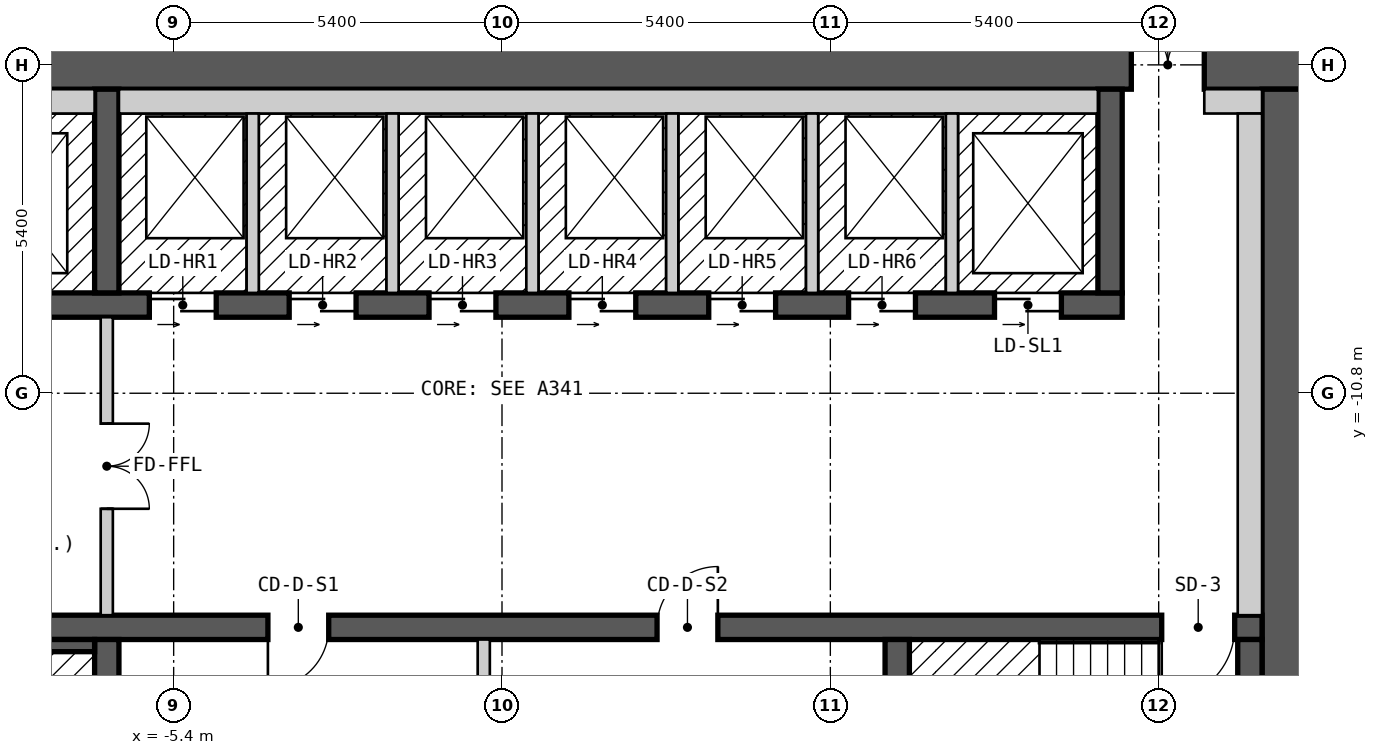
"""IFC4 building model, lengths in metres.
Left out: names, types, materials, properties, quantities, classifications, styles, units other than length and angle.
Written with IfcOpenShell. Run it as: python <this file> out.ifc"""

import sys

from ifc_helpers import new_model, si_unit, direction, frame, frame_2d, origin, place, context, subcontext, project, spatial, rectangle, extrude, element, fill, save


model = new_model("IFC4")
c1 = context("Model", 3, precision=1e-05, world=origin(), true_north=direction((0.0, 1.0)))
c2 = subcontext(c1, "Body", "Model", "MODEL_VIEW")
j1 = project(units=[si_unit("LENGTHUNIT", "METRE"), si_unit("PLANEANGLEUNIT", "RADIAN")], contexts=[c1])
p1 = place(None, origin())
s1 = spatial("IfcSite", under=j1, at=p1, CompositionType="ELEMENT")
p2 = place(p1, origin())
s2 = spatial("IfcBuilding", under=s1, at=p2, CompositionType="ELEMENT")
p3 = place(p2, frame((0.0, 0.0, 150.6)))
s3 = spatial("IfcBuildingStorey", under=s2, at=p3, CompositionType="ELEMENT", Elevation=150.6)
p4 = place(p3, frame((-13.3, -5.4, 0.0), z_axis=(0.0, 0.0, 1.0), x_axis=(1.0, 0.0, 0.0)))
e1 = element("IfcWall", 1, at=p4, inside=s3, PredefinedType="SHEAR", context=c2, shape_type="SweptSolid", body=[
    extrude(rectangle(XDim=26.6, YDim=0.8, at=frame_2d((13.3, 0.0))), origin(), (0.0, 0.0, 1.0), 2.6),
])
p5 = place(p4, frame((23.65, 0.0, 0.0)))
e2 = element("IfcOpeningElement", 2, at=p5, cuts=e1, PredefinedType="OPENING", context=c2, shape_type="SweptSolid", body=[
    extrude(rectangle(XDim=1.2, YDim=2.1, at=frame_2d((0.6, 1.05))), frame((0.0, 0.41, 0.0), z_axis=(0.0, -1.0, 0.0), x_axis=(1.0, 0.0, 0.0)), (0.0, 0.0, 1.0), 0.82),
])
p6 = place(p3, frame((12.9, -18.2, 0.0), z_axis=(0.0, 0.0, 1.0), x_axis=(0.0, 1.0, 0.0)))
e3 = element("IfcWall", 3, at=p6, inside=s3, PredefinedType="SHEAR", context=c2, shape_type="SweptSolid", body=[
    extrude(rectangle(XDim=12.4, YDim=0.8, at=frame_2d((6.2, 0.0))), origin(), (0.0, 0.0, 1.0), 2.6),
])
p7 = place(p3, frame((-12.5, -14.65, 0.0), z_axis=(0.0, 0.0, 1.0), x_axis=(1.0, 0.0, 0.0)))
e4 = element("IfcWall", 4, at=p7, inside=s3, PredefinedType="SHEAR", context=c2, shape_type="SweptSolid", body=[
    extrude(rectangle(XDim=25.0, YDim=0.4, at=frame_2d((12.5, 0.0))), origin(), (0.0, 0.0, 1.0), 2.6),
])
p8 = place(p7, frame((1.7, 0.0, 0.0), z_axis=(0.0, 0.0, 1.0), x_axis=(-1.0, 0.0, 0.0)))
e5 = element("IfcOpeningElement", 5, at=p8, cuts=e4, PredefinedType="OPENING", context=c2, shape_type="SweptSolid", body=[
    extrude(rectangle(XDim=1.2, YDim=2.1, at=frame_2d((0.6, 1.05))), frame((0.0, 0.21, 0.0), z_axis=(0.0, -1.0, 0.0), x_axis=(1.0, 0.0, 0.0)), (0.0, 0.0, 1.0), 0.42),
])
p9 = place(p7, frame((24.55, 0.0, 0.0), z_axis=(0.0, 0.0, 1.0), x_axis=(-1.0, 0.0, 0.0)))
e6 = element("IfcOpeningElement", 6, at=p9, cuts=e4, PredefinedType="OPENING", context=c2, shape_type="SweptSolid", body=[
    extrude(rectangle(XDim=1.2, YDim=2.1, at=frame_2d((0.6, 1.05))), frame((0.0, 0.21, 0.0), z_axis=(0.0, -1.0, 0.0), x_axis=(1.0, 0.0, 0.0)), (0.0, 0.0, 1.0), 0.42),
])
p10 = place(p7, frame((9.65, 0.0, 0.0), z_axis=(0.0, 0.0, 1.0), x_axis=(-1.0, 0.0, 0.0)))
e7 = element("IfcOpeningElement", 7, at=p10, cuts=e4, PredefinedType="OPENING", context=c2, shape_type="SweptSolid", body=[
    extrude(rectangle(XDim=1.0, YDim=2.1, at=frame_2d((0.5, 1.05))), frame((0.0, 0.21, 0.0), z_axis=(0.0, -1.0, 0.0), x_axis=(1.0, 0.0, 0.0)), (0.0, 0.0, 1.0), 0.42),
])
p11 = place(p7, frame((16.05, 0.0, 0.0), z_axis=(0.0, 0.0, 1.0), x_axis=(-1.0, 0.0, 0.0)))
e8 = element("IfcOpeningElement", 8, at=p11, cuts=e4, PredefinedType="OPENING", context=c2, shape_type="SweptSolid", body=[
    extrude(rectangle(XDim=1.0, YDim=2.1, at=frame_2d((0.5, 1.05))), frame((0.0, 0.21, 0.0), z_axis=(0.0, -1.0, 0.0), x_axis=(1.0, 0.0, 0.0)), (0.0, 0.0, 1.0), 0.42),
])
p12 = place(p3, frame((-12.5, -9.35, 0.0), z_axis=(0.0, 0.0, 1.0), x_axis=(1.0, 0.0, 0.0)))
e9 = element("IfcWall", 9, at=p12, inside=s3, PredefinedType="SHEAR", context=c2, shape_type="SweptSolid", body=[
    extrude(rectangle(XDim=22.7, YDim=0.4, at=frame_2d((11.35, 0.0))), origin(), (0.0, 0.0, 1.0), 2.6),
])
p13 = place(p12, frame((1.1, 0.0, 0.0)))
e10 = element("IfcOpeningElement", 10, at=p13, cuts=e9, PredefinedType="OPENING", context=c2, shape_type="SweptSolid", body=[
    extrude(rectangle(XDim=1.1, YDim=2.1, at=frame_2d((0.55, 1.05))), frame((0.0, 0.21, 0.0), z_axis=(0.0, -1.0, 0.0), x_axis=(1.0, 0.0, 0.0)), (0.0, 0.0, 1.0), 0.42),
])
p14 = place(p12, frame((3.9, 0.0, 0.0)))
e11 = element("IfcOpeningElement", 11, at=p14, cuts=e9, PredefinedType="OPENING", context=c2, shape_type="SweptSolid", body=[
    extrude(rectangle(XDim=1.1, YDim=2.1, at=frame_2d((0.55, 1.05))), frame((0.0, 0.21, 0.0), z_axis=(0.0, -1.0, 0.0), x_axis=(1.0, 0.0, 0.0)), (0.0, 0.0, 1.0), 0.42),
])
p15 = place(p12, frame((6.7, 0.0, 0.0)))
e12 = element("IfcOpeningElement", 12, at=p15, cuts=e9, PredefinedType="OPENING", context=c2, shape_type="SweptSolid", body=[
    extrude(rectangle(XDim=1.1, YDim=2.1, at=frame_2d((0.55, 1.05))), frame((0.0, 0.21, 0.0), z_axis=(0.0, -1.0, 0.0), x_axis=(1.0, 0.0, 0.0)), (0.0, 0.0, 1.0), 0.42),
])
p16 = place(p12, frame((9.0, 0.0, 0.0)))
e13 = element("IfcOpeningElement", 13, at=p16, cuts=e9, PredefinedType="OPENING", context=c2, shape_type="SweptSolid", body=[
    extrude(rectangle(XDim=1.1, YDim=2.1, at=frame_2d((0.55, 1.05))), frame((0.0, 0.21, 0.0), z_axis=(0.0, -1.0, 0.0), x_axis=(1.0, 0.0, 0.0)), (0.0, 0.0, 1.0), 0.42),
])
p17 = place(p12, frame((11.3, 0.0, 0.0)))
e14 = element("IfcOpeningElement", 14, at=p17, cuts=e9, PredefinedType="OPENING", context=c2, shape_type="SweptSolid", body=[
    extrude(rectangle(XDim=1.1, YDim=2.1, at=frame_2d((0.55, 1.05))), frame((0.0, 0.21, 0.0), z_axis=(0.0, -1.0, 0.0), x_axis=(1.0, 0.0, 0.0)), (0.0, 0.0, 1.0), 0.42),
])
p18 = place(p12, frame((13.6, 0.0, 0.0)))
e15 = element("IfcOpeningElement", 15, at=p18, cuts=e9, PredefinedType="OPENING", context=c2, shape_type="SweptSolid", body=[
    extrude(rectangle(XDim=1.1, YDim=2.1, at=frame_2d((0.55, 1.05))), frame((0.0, 0.21, 0.0), z_axis=(0.0, -1.0, 0.0), x_axis=(1.0, 0.0, 0.0)), (0.0, 0.0, 1.0), 0.42),
])
p19 = place(p12, frame((15.9, 0.0, 0.0)))
e16 = element("IfcOpeningElement", 16, at=p19, cuts=e9, PredefinedType="OPENING", context=c2, shape_type="SweptSolid", body=[
    extrude(rectangle(XDim=1.1, YDim=2.1, at=frame_2d((0.55, 1.05))), frame((0.0, 0.21, 0.0), z_axis=(0.0, -1.0, 0.0), x_axis=(1.0, 0.0, 0.0)), (0.0, 0.0, 1.0), 0.42),
])
p20 = place(p12, frame((18.2, 0.0, 0.0)))
e17 = element("IfcOpeningElement", 17, at=p20, cuts=e9, PredefinedType="OPENING", context=c2, shape_type="SweptSolid", body=[
    extrude(rectangle(XDim=1.1, YDim=2.1, at=frame_2d((0.55, 1.05))), frame((0.0, 0.21, 0.0), z_axis=(0.0, -1.0, 0.0), x_axis=(1.0, 0.0, 0.0)), (0.0, 0.0, 1.0), 0.42),
])
p21 = place(p12, frame((20.6, 0.0, 0.0)))
e18 = element("IfcOpeningElement", 18, at=p21, cuts=e9, PredefinedType="OPENING", context=c2, shape_type="SweptSolid", body=[
    extrude(rectangle(XDim=1.1, YDim=2.1, at=frame_2d((0.55, 1.05))), frame((0.0, 0.21, 0.0), z_axis=(0.0, -1.0, 0.0), x_axis=(1.0, 0.0, 0.0)), (0.0, 0.0, 1.0), 0.42),
])
for number, where, z_axis, x_axis in (
    (19, (-6.5, -18.2, 0.0), (0.0, 0.0, 1.0), (0.0, 1.0, 0.0)),
    (20, (6.5, -18.2, 0.0), (0.0, 0.0, 1.0), (0.0, 1.0, 0.0)),
    (21, (-6.5, -9.15, 0.0), (0.0, 0.0, 1.0), (0.0, 1.0, 0.0)),
    (22, (10.0, -9.15, 0.0), (0.0, 0.0, 1.0), (0.0, 1.0, 0.0)),
):
    element("IfcWall", number, at=place(p3, frame(where, z_axis=z_axis, x_axis=x_axis)), inside=s3, PredefinedType="SHEAR", context=c2, shape_type="SweptSolid", body=[
        extrude(rectangle(XDim=3.35, YDim=0.4, at=frame_2d((1.675, 0.0))), origin(), (0.0, 0.0, 1.0), 2.6),
    ])
p22 = place(p3, frame((-12.1, -6.0, 0.0), z_axis=(0.0, 0.0, 1.0), x_axis=(1.0, 0.0, 0.0)))
e23 = element("IfcWall", 23, at=p22, inside=s3, PredefinedType="SOLIDWALL", context=c2, shape_type="SweptSolid", body=[
    extrude(rectangle(XDim=5.4, YDim=0.4, at=frame_2d((2.7, 0.0))), origin(), (0.0, 0.0, 1.0), 2.6),
])
p23 = place(p3, frame((-10.8, -14.95, 0.0), z_axis=(0.0, 0.0, 1.0), x_axis=(1.0, 0.0, 0.0)))
e24 = element("IfcWall", 24, at=p23, inside=s3, PredefinedType="SOLIDWALL", context=c2, shape_type="SweptSolid", body=[
    extrude(rectangle(XDim=4.1, YDim=0.2, at=frame_2d((2.05, 0.0))), origin(), (0.0, 0.0, 1.0), 2.6),
])
p24 = place(p3, frame((-6.5, -14.45, 0.0), z_axis=(0.0, 0.0, 1.0), x_axis=(0.0, 1.0, 0.0)))
e25 = element("IfcWall", 25, at=p24, inside=s3, PredefinedType="PARTITIONING", context=c2, shape_type="SweptSolid", body=[
    extrude(rectangle(XDim=4.9, YDim=0.2, at=frame_2d((2.45, 0.0))), origin(), (0.0, 0.0, 1.0), 2.6),
])
p25 = place(p24, frame((3.15, 0.0, 0.0), z_axis=(0.0, 0.0, 1.0), x_axis=(-1.0, 0.0, 0.0)))
e26 = element("IfcOpeningElement", 26, at=p25, cuts=e25, PredefinedType="OPENING", context=c2, shape_type="SweptSolid", body=[
    extrude(rectangle(XDim=1.4, YDim=2.1, at=frame_2d((0.7, 1.05))), frame((0.0, 0.11, 0.0), z_axis=(0.0, -1.0, 0.0), x_axis=(1.0, 0.0, 0.0)), (0.0, 0.0, 1.0), 0.22),
])
p26 = place(p3, frame((-6.3, -6.0, 0.0), z_axis=(0.0, 0.0, 1.0), x_axis=(1.0, 0.0, 0.0)))
e27 = element("IfcWall", 27, at=p26, inside=s3, PredefinedType="SOLIDWALL", context=c2, shape_type="SweptSolid", body=[
    extrude(rectangle(XDim=16.1, YDim=0.4, at=frame_2d((8.05, 0.0))), origin(), (0.0, 0.0, 1.0), 2.6),
])
for number, where, z_axis, x_axis in (
    (28, (-4.1, -9.15, 0.0), (0.0, 0.0, 1.0), (0.0, 1.0, 0.0)),
    (29, (-1.8, -9.15, 0.0), (0.0, 0.0, 1.0), (0.0, 1.0, 0.0)),
):
    element("IfcWall", number, at=place(p3, frame(where, z_axis=z_axis, x_axis=x_axis)), inside=s3, PredefinedType="SOLIDWALL", context=c2, shape_type="SweptSolid", body=[
        extrude(rectangle(XDim=2.95, YDim=0.2, at=frame_2d((1.475, 0.0))), origin(), (0.0, 0.0, 1.0), 2.6),
    ])
p27 = place(p3, frame((-0.3, -17.8, 0.0), z_axis=(0.0, 0.0, 1.0), x_axis=(0.0, 1.0, 0.0)))
e30 = element("IfcWall", 30, at=p27, inside=s3, PredefinedType="PARTITIONING", context=c2, shape_type="SweptSolid", body=[
    extrude(rectangle(XDim=2.95, YDim=0.2, at=frame_2d((1.475, 0.0))), origin(), (0.0, 0.0, 1.0), 2.6),
])
for number, where, z_axis, x_axis in (
    (31, (0.5, -9.15, 0.0), (0.0, 0.0, 1.0), (0.0, 1.0, 0.0)),
    (32, (2.8, -9.15, 0.0), (0.0, 0.0, 1.0), (0.0, 1.0, 0.0)),
    (33, (5.1, -9.15, 0.0), (0.0, 0.0, 1.0), (0.0, 1.0, 0.0)),
    (34, (7.4, -9.15, 0.0), (0.0, 0.0, 1.0), (0.0, 1.0, 0.0)),
):
    element("IfcWall", number, at=place(p3, frame(where, z_axis=z_axis, x_axis=x_axis)), inside=s3, PredefinedType="SOLIDWALL", context=c2, shape_type="SweptSolid", body=[
        extrude(rectangle(XDim=2.95, YDim=0.2, at=frame_2d((1.475, 0.0))), origin(), (0.0, 0.0, 1.0), 2.6),
    ])
p28 = place(p3, frame((11.55, -6.0, 0.0), z_axis=(0.0, 0.0, 1.0), x_axis=(1.0, 0.0, 0.0)))
e35 = element("IfcWall", 35, at=p28, inside=s3, PredefinedType="PARTITIONING", context=c2, shape_type="SweptSolid", body=[
    extrude(rectangle(XDim=0.95, YDim=0.4, at=frame_2d((0.475, 0.0))), origin(), (0.0, 0.0, 1.0), 2.6),
])
p29 = place(p3, frame((12.3, -17.6, 0.0), z_axis=(0.0, 0.0, 1.0), x_axis=(0.0, 1.0, 0.0)))
e36 = element("IfcWall", 36, at=p29, inside=s3, PredefinedType="SOLIDWALL", context=c2, shape_type="SweptSolid", body=[
    extrude(rectangle(XDim=2.75, YDim=0.4, at=frame_2d((1.375, 0.0))), origin(), (0.0, 0.0, 1.0), 2.6),
])
p30 = place(p3, frame((12.3, -14.45, 0.0), z_axis=(0.0, 0.0, 1.0), x_axis=(0.0, 1.0, 0.0)))
e37 = element("IfcWall", 37, at=p30, inside=s3, PredefinedType="PARTITIONING", context=c2, shape_type="SweptSolid", body=[
    extrude(rectangle(XDim=8.25, YDim=0.4, at=frame_2d((4.125, 0.0))), origin(), (0.0, 0.0, 1.0), 2.6),
])
p31 = place(p15, origin())
e38 = element("IfcDoor", 38, at=p31, inside=s3, OperationType="DOUBLE_DOOR_SLIDING", PredefinedType="DOOR", context=c2, shape_type="SweptSolid", body=[
    extrude(rectangle(XDim=1.1, YDim=2.1, at=frame_2d((0.55, 1.05))), frame((0.0, 0.025, 0.0), z_axis=(0.0, -1.0, 0.0), x_axis=(1.0, 0.0, 0.0)), (0.0, 0.0, 1.0), 0.05),
])
fill(e12, e38)
p32 = place(p16, origin())
e39 = element("IfcDoor", 39, at=p32, inside=s3, OperationType="DOUBLE_DOOR_SLIDING", PredefinedType="DOOR", context=c2, shape_type="SweptSolid", body=[
    extrude(rectangle(XDim=1.1, YDim=2.1, at=frame_2d((0.55, 1.05))), frame((0.0, 0.025, 0.0), z_axis=(0.0, -1.0, 0.0), x_axis=(1.0, 0.0, 0.0)), (0.0, 0.0, 1.0), 0.05),
])
fill(e13, e39)
p33 = place(p17, origin())
e40 = element("IfcDoor", 40, at=p33, inside=s3, OperationType="DOUBLE_DOOR_SLIDING", PredefinedType="DOOR", context=c2, shape_type="SweptSolid", body=[
    extrude(rectangle(XDim=1.1, YDim=2.1, at=frame_2d((0.55, 1.05))), frame((0.0, 0.025, 0.0), z_axis=(0.0, -1.0, 0.0), x_axis=(1.0, 0.0, 0.0)), (0.0, 0.0, 1.0), 0.05),
])
fill(e14, e40)
p34 = place(p18, origin())
e41 = element("IfcDoor", 41, at=p34, inside=s3, OperationType="DOUBLE_DOOR_SLIDING", PredefinedType="DOOR", context=c2, shape_type="SweptSolid", body=[
    extrude(rectangle(XDim=1.1, YDim=2.1, at=frame_2d((0.55, 1.05))), frame((0.0, 0.025, 0.0), z_axis=(0.0, -1.0, 0.0), x_axis=(1.0, 0.0, 0.0)), (0.0, 0.0, 1.0), 0.05),
])
fill(e15, e41)
p35 = place(p19, origin())
e42 = element("IfcDoor", 42, at=p35, inside=s3, OperationType="DOUBLE_DOOR_SLIDING", PredefinedType="DOOR", context=c2, shape_type="SweptSolid", body=[
    extrude(rectangle(XDim=1.1, YDim=2.1, at=frame_2d((0.55, 1.05))), frame((0.0, 0.025, 0.0), z_axis=(0.0, -1.0, 0.0), x_axis=(1.0, 0.0, 0.0)), (0.0, 0.0, 1.0), 0.05),
])
fill(e16, e42)
p36 = place(p20, origin())
e43 = element("IfcDoor", 43, at=p36, inside=s3, OperationType="DOUBLE_DOOR_SLIDING", PredefinedType="DOOR", context=c2, shape_type="SweptSolid", body=[
    extrude(rectangle(XDim=1.1, YDim=2.1, at=frame_2d((0.55, 1.05))), frame((0.0, 0.025, 0.0), z_axis=(0.0, -1.0, 0.0), x_axis=(1.0, 0.0, 0.0)), (0.0, 0.0, 1.0), 0.05),
])
fill(e17, e43)
p37 = place(p21, origin())
e44 = element("IfcDoor", 44, at=p37, inside=s3, OperationType="DOUBLE_DOOR_SLIDING", PredefinedType="DOOR", context=c2, shape_type="SweptSolid", body=[
    extrude(rectangle(XDim=1.1, YDim=2.1, at=frame_2d((0.55, 1.05))), frame((0.0, 0.025, 0.0), z_axis=(0.0, -1.0, 0.0), x_axis=(1.0, 0.0, 0.0)), (0.0, 0.0, 1.0), 0.05),
])
fill(e18, e44)
p38 = place(p9, origin())
e45 = element("IfcDoor", 45, at=p38, inside=s3, OperationType="SINGLE_SWING_RIGHT", PredefinedType="DOOR", context=c2, shape_type="SweptSolid", body=[
    extrude(rectangle(XDim=1.2, YDim=2.1, at=frame_2d((0.6, 1.05))), frame((0.0, 0.025, 0.0), z_axis=(0.0, -1.0, 0.0), x_axis=(1.0, 0.0, 0.0)), (0.0, 0.0, 1.0), 0.05),
])
fill(e6, e45)
p39 = place(p25, origin())
e46 = element("IfcDoor", 46, at=p39, inside=s3, OperationType="DOUBLE_DOOR_SINGLE_SWING", PredefinedType="DOOR", context=c2, shape_type="SweptSolid", body=[
    extrude(rectangle(XDim=1.4, YDim=2.1, at=frame_2d((0.7, 1.05))), frame((0.0, 0.025, 0.0), z_axis=(0.0, -1.0, 0.0), x_axis=(1.0, 0.0, 0.0)), (0.0, 0.0, 1.0), 0.05),
])
fill(e26, e46)
p40 = place(p5, origin())
e47 = element("IfcDoor", 47, at=p40, inside=s3, OperationType="DOUBLE_DOOR_SINGLE_SWING", PredefinedType="DOOR", context=c2, shape_type="SweptSolid", body=[
    extrude(rectangle(XDim=1.2, YDim=2.1, at=frame_2d((0.6, 1.05))), frame((0.0, 0.025, 0.0), z_axis=(0.0, -1.0, 0.0), x_axis=(1.0, 0.0, 0.0)), (0.0, 0.0, 1.0), 0.05),
])
fill(e2, e47)
p41 = place(p10, origin())
e48 = element("IfcDoor", 48, at=p41, inside=s3, OperationType="SINGLE_SWING_RIGHT", PredefinedType="DOOR", context=c2, shape_type="SweptSolid", body=[
    extrude(rectangle(XDim=1.0, YDim=2.1, at=frame_2d((0.5, 1.05))), frame((0.0, 0.025, 0.0), z_axis=(0.0, -1.0, 0.0), x_axis=(1.0, 0.0, 0.0)), (0.0, 0.0, 1.0), 0.05),
])
fill(e7, e48)
p42 = place(p11, origin())
e49 = element("IfcDoor", 49, at=p42, inside=s3, OperationType="SINGLE_SWING_LEFT", PredefinedType="DOOR", context=c2, shape_type="SweptSolid", body=[
    extrude(rectangle(XDim=1.0, YDim=2.1, at=frame_2d((0.5, 1.05))), frame((0.0, 0.025, 0.0), z_axis=(0.0, -1.0, 0.0), x_axis=(1.0, 0.0, 0.0)), (0.0, 0.0, 1.0), 0.05),
])
fill(e8, e49)
save(model, sys.argv[1])
